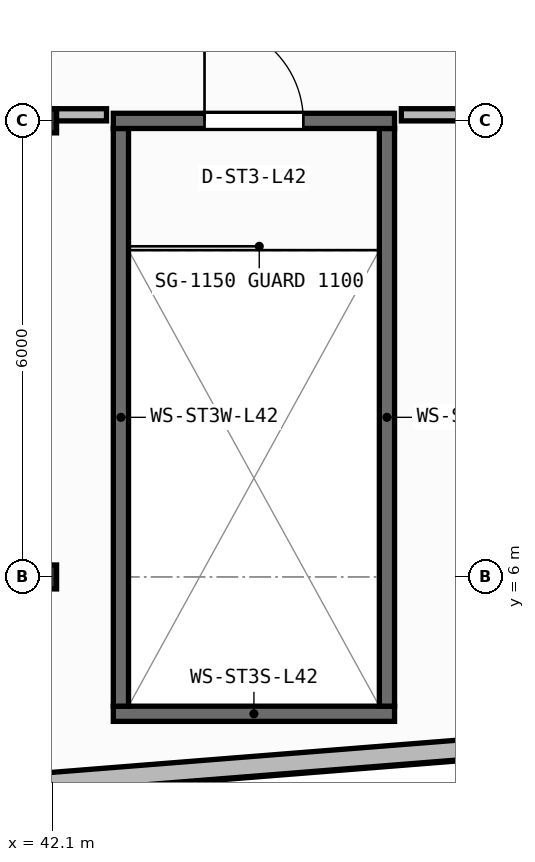
"""IFC4 building model, lengths in metres.
Left out: names, types, materials, properties, quantities, classifications, styles, units other than length and angle.
Written with IfcOpenShell. Run it as: python <this file> out.ifc"""

import sys

from ifc_helpers import new_model, si_unit, direction, frame, frame_2d, origin, origin_2d, place, context, subcontext, project, spatial, rectangle, i_section, extrude, element, fill, save


model = new_model("IFC4")
c1 = context("Model", 3, precision=1e-05, world=origin(), true_north=direction((0.0, 1.0)))
c2 = subcontext(c1, "Body", "Model", "MODEL_VIEW")
j1 = project(units=[si_unit("LENGTHUNIT", "METRE"), si_unit("PLANEANGLEUNIT", "RADIAN")], contexts=[c1])
p1 = place(None, origin())
s1 = spatial("IfcSite", under=j1, at=p1, CompositionType="ELEMENT")
p2 = place(p1, origin())
s2 = spatial("IfcBuilding", under=s1, at=p2, CompositionType="ELEMENT")
p3 = place(p2, frame((0.0, 0.0, 170.5)))
s3 = spatial("IfcBuildingStorey", under=s2, at=p3, CompositionType="ELEMENT", Elevation=170.5)
for number, where, z_axis, x_axis in (
    (1, (42.0, 6.0, 0.0), (0.0, 0.0, 1.0), (1.0, 0.0, 0.0)),
    (2, (42.0, 12.0, 0.0), (0.0, 0.0, 1.0), (1.0, 0.0, 0.0)),
):
    element("IfcColumn", number, at=place(p3, frame(where, z_axis=z_axis, x_axis=x_axis)), inside=s3, PredefinedType="COLUMN", context=c2, shape_type="SweptSolid", body=[
        extrude(i_section(OverallWidth=0.307, OverallDepth=0.315, WebThickness=0.012, FlangeThickness=0.019, FilletRadius=0.017, at=origin_2d()), origin(), (0.0, 0.0, 1.0), 3.95),
    ])
p4 = place(p3, frame((2.76, 0.173, 0.0), z_axis=(0.0, 0.0, 1.0), x_axis=(0.996857931723, 0.079210251617, 0.0)))
e3 = element("IfcWall", 3, at=p4, inside=s3, PredefinedType="STANDARD", context=c2, shape_type="SweptSolid", body=[
    extrude(rectangle(XDim=51.442, YDim=0.26, at=frame_2d((25.721, 0.0))), origin(), (0.0, 0.0, 1.0), 3.67),
])
p5 = place(p4, frame((24.521, 0.0, 0.9)))
e4 = element("IfcOpeningElement", 4, at=p5, cuts=e3, PredefinedType="OPENING", context=c2, shape_type="SweptSolid", body=[
    extrude(rectangle(XDim=2.4, YDim=1.65, at=frame_2d((1.2, 0.825))), frame((0.0, 0.14, 0.0), z_axis=(0.0, -1.0, 0.0), x_axis=(1.0, 0.0, 0.0)), (0.0, 0.0, 1.0), 0.28),
])
p6 = place(p3, frame((42.9, 4.2, 0.0), z_axis=(0.0, 0.0, 1.0), x_axis=(1.0, 0.0, 0.0)))
e5 = element("IfcWall", 5, at=p6, inside=s3, PredefinedType="SHEAR", context=c2, shape_type="SweptSolid", body=[
    extrude(rectangle(XDim=3.7, YDim=0.2, at=frame_2d((1.85, 0.0))), origin(), (0.0, 0.0, 1.0), 3.67),
])
for number, where, z_axis, x_axis in (
    (6, (43.0, 4.3, 0.0), (0.0, 0.0, 1.0), (0.0, 1.0, 0.0)),
    (7, (46.5, 4.3, 0.0), (0.0, 0.0, 1.0), (0.0, 1.0, 0.0)),
):
    element("IfcWall", number, at=place(p3, frame(where, z_axis=z_axis, x_axis=x_axis)), inside=s3, PredefinedType="SHEAR", context=c2, shape_type="SweptSolid", body=[
        extrude(rectangle(XDim=7.6, YDim=0.2, at=frame_2d((3.8, 0.0))), origin(), (0.0, 0.0, 1.0), 3.67),
    ])
p7 = place(p3, frame((42.9, 12.0, 0.0), z_axis=(0.0, 0.0, 1.0), x_axis=(1.0, 0.0, 0.0)))
e8 = element("IfcWall", 8, at=p7, inside=s3, PredefinedType="SHEAR", context=c2, shape_type="SweptSolid", body=[
    extrude(rectangle(XDim=3.7, YDim=0.2, at=frame_2d((1.85, 0.0))), origin(), (0.0, 0.0, 1.0), 3.67),
])
p8 = place(p7, frame((1.2, 0.0, 0.0)))
e9 = element("IfcOpeningElement", 9, at=p8, cuts=e8, PredefinedType="OPENING", context=c2, shape_type="SweptSolid", body=[
    extrude(rectangle(XDim=1.3, YDim=2.15, at=frame_2d((0.65, 1.075))), frame((0.0, 0.11, 0.0), z_axis=(0.0, -1.0, 0.0), x_axis=(1.0, 0.0, 0.0)), (0.0, 0.0, 1.0), 0.22),
])
p9 = place(p3, frame((40.03, 12.08, 0.0), z_axis=(0.0, 0.0, 1.0), x_axis=(1.0, 0.0, 0.0)))
e10 = element("IfcWall", 10, at=p9, inside=s3, PredefinedType="PARTITIONING", context=c2, shape_type="SweptSolid", body=[
    extrude(rectangle(XDim=2.781, YDim=0.16, at=frame_2d((1.39, 0.0))), origin(), (0.0, 0.0, 1.0), 3.043),
])
p10 = place(p3, frame((46.689, 12.08, 0.0), z_axis=(0.0, 0.0, 1.0), x_axis=(1.0, 0.0, 0.0)))
e11 = element("IfcWall", 11, at=p10, inside=s3, PredefinedType="PARTITIONING", context=c2, shape_type="SweptSolid", body=[
    extrude(rectangle(XDim=3.011, YDim=0.16, at=frame_2d((1.505, 0.0))), origin(), (0.0, 0.0, 1.0), 3.043),
])
p11 = place(p8, origin())
e12 = element("IfcDoor", 12, at=p11, inside=s3, OperationType="SINGLE_SWING_LEFT", PredefinedType="DOOR", context=c2, shape_type="SweptSolid", body=[
    extrude(rectangle(XDim=1.3, YDim=2.15, at=frame_2d((0.65, 1.075))), frame((0.0, 0.025, 0.0), z_axis=(0.0, -1.0, 0.0), x_axis=(1.0, 0.0, 0.0)), (0.0, 0.0, 1.0), 0.05),
])
fill(e9, e12)
save(model, sys.argv[1])
